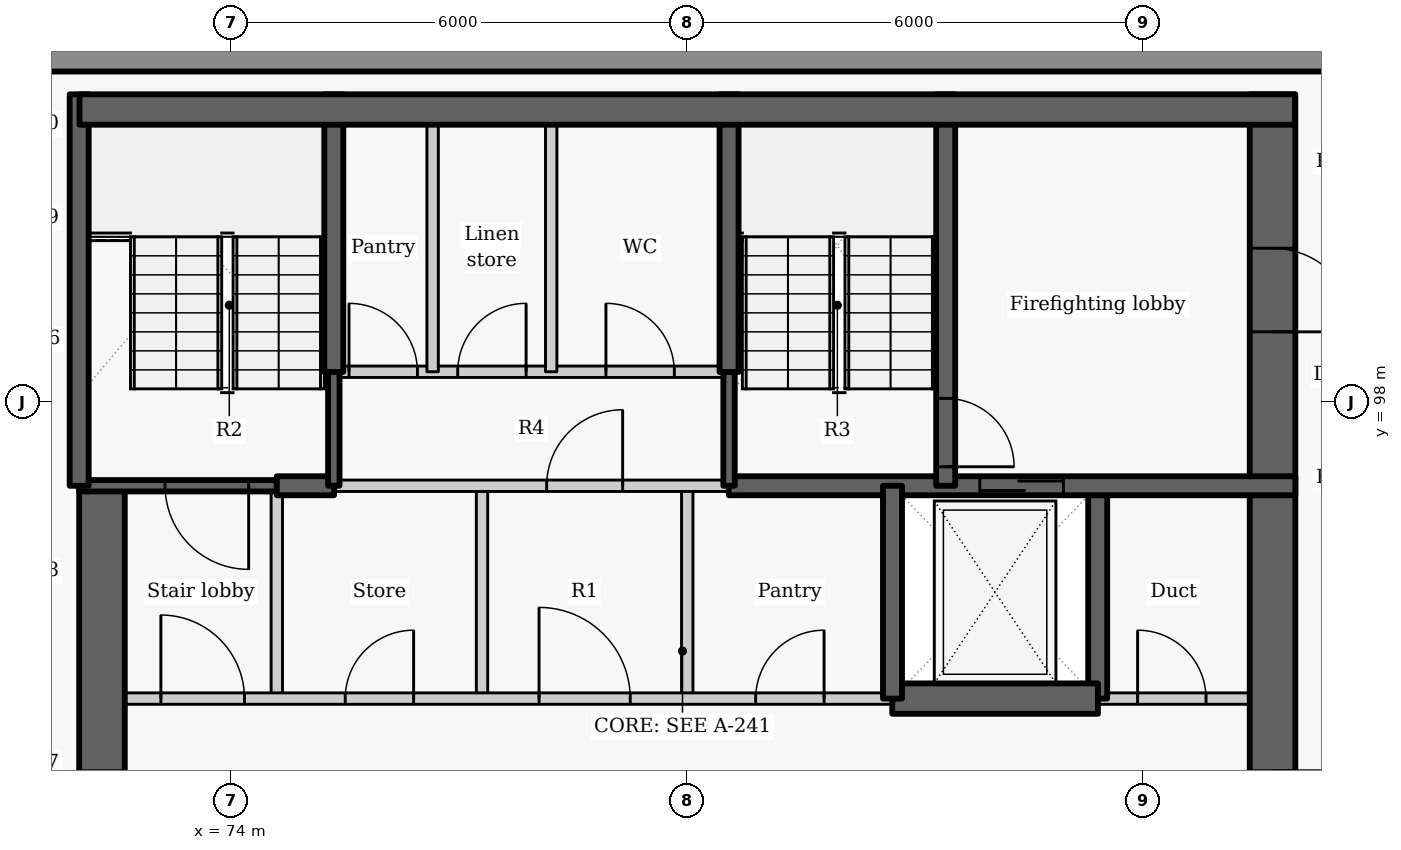
"""IFC4 building model, lengths in metres.
Left out: names, types, materials, properties, quantities, classifications, styles, units other than length and angle.
Written with IfcOpenShell. Run it as: python <this file> out.ifc"""

import sys

from ifc_helpers import new_model, si_unit, direction, frame, frame_2d, origin, place, context, subcontext, project, spatial, rectangle, extrude, element, fill, save


model = new_model("IFC4")
c1 = context("Model", 3, precision=1e-05, world=origin(), true_north=direction((0.0, 1.0)))
c2 = subcontext(c1, "Body", "Model", "MODEL_VIEW")
j1 = project(units=[si_unit("LENGTHUNIT", "METRE"), si_unit("PLANEANGLEUNIT", "RADIAN")], contexts=[c1])
p1 = place(None, origin())
s1 = spatial("IfcSite", under=j1, at=p1, CompositionType="ELEMENT")
p2 = place(p1, origin())
s2 = spatial("IfcBuilding", under=s1, at=p2, CompositionType="ELEMENT")
p3 = place(p2, frame((0.0, 0.0, 239.4)))
s3 = spatial("IfcBuildingStorey", under=s2, at=p3, CompositionType="ELEMENT", Elevation=239.4)
p4 = place(p3, frame((89.499, 102.5, 0.0), z_axis=(0.0, 0.0, 1.0), x_axis=(-1.0, 0.0, 0.0)))
e1 = element("IfcWall", 1, at=p4, inside=s3, PredefinedType="SOLIDWALL", context=c2, shape_type="SweptSolid", body=[
    extrude(rectangle(XDim=19.033, YDim=0.3, at=frame_2d((9.517, 0.0))), origin(), (0.0, 0.0, 1.0), 2.425),
])
p5 = place(p3, frame((74.6, 94.1, 0.0), z_axis=(0.0, 0.0, 1.0), x_axis=(0.0, 1.0, 0.0)))
e2 = element("IfcWall", 2, at=p5, inside=s3, PredefinedType="PARTITIONING", context=c2, shape_type="SweptSolid", body=[
    extrude(rectangle(XDim=2.8, YDim=0.15, at=frame_2d((1.4, 0.0))), origin(), (0.0, 0.0, 1.0), 3.025),
])
p6 = place(p3, frame((72.3, 87.8, -0.275), z_axis=(0.0, 0.0, 1.0), x_axis=(0.0, 1.0, 0.0)))
e3 = element("IfcWall", 3, at=p6, inside=s3, PredefinedType="SHEAR", context=c2, shape_type="SweptSolid", body=[
    extrude(rectangle(XDim=9.1, YDim=0.6, at=frame_2d((4.55, 0.0))), origin(), (0.0, 0.0, 1.0), 3.3),
])
p7 = place(p6, frame((3.85, 0.0, 0.275)))
e4 = element("IfcOpeningElement", 4, at=p7, cuts=e3, PredefinedType="OPENING", context=c2, shape_type="SweptSolid", body=[
    extrude(rectangle(XDim=1.5, YDim=2.1, at=frame_2d((0.75, 1.05))), frame((0.0, 0.31, 0.0), z_axis=(0.0, -1.0, 0.0), x_axis=(1.0, 0.0, 0.0)), (0.0, 0.0, 1.0), 0.62),
])
p8 = place(p3, frame((85.4, 94.1, -0.275), z_axis=(0.0, 0.0, 1.0), x_axis=(0.0, 1.0, 0.0)))
e5 = element("IfcWall", 5, at=p8, inside=s3, PredefinedType="SHEAR", context=c2, shape_type="SweptSolid", body=[
    extrude(rectangle(XDim=2.8, YDim=0.25, at=frame_2d((1.4, 0.0))), origin(), (0.0, 0.0, 1.0), 3.3),
])
p9 = place(p3, frame((87.7, 102.05, -0.275), z_axis=(0.0, 0.0, 1.0), x_axis=(0.0, -1.0, 0.0)))
e6 = element("IfcWall", 6, at=p9, inside=s3, PredefinedType="SHEAR", context=c2, shape_type="SweptSolid", body=[
    extrude(rectangle(XDim=14.25, YDim=0.6, at=frame_2d((7.125, 0.0))), origin(), (0.0, 0.0, 1.0), 3.3),
])
p10 = place(p9, frame((8.9, 0.0, 0.275)))
e7 = element("IfcOpeningElement", 7, at=p10, cuts=e6, PredefinedType="OPENING", context=c2, shape_type="SweptSolid", body=[
    extrude(rectangle(XDim=1.5, YDim=2.1, at=frame_2d((0.75, 1.05))), frame((0.0, 0.31, 0.0), z_axis=(0.0, -1.0, 0.0), x_axis=(1.0, 0.0, 0.0)), (0.0, 0.0, 1.0), 0.62),
])
p11 = place(p9, frame((2.025, 0.0, 0.275)))
e8 = element("IfcOpeningElement", 8, at=p11, cuts=e6, PredefinedType="OPENING", context=c2, shape_type="SweptSolid", body=[
    extrude(rectangle(XDim=1.1, YDim=2.1, at=frame_2d((0.55, 1.05))), frame((0.0, 0.31, 0.0), z_axis=(0.0, -1.0, 0.0), x_axis=(1.0, 0.0, 0.0)), (0.0, 0.0, 1.0), 0.62),
])
for number, where, z_axis, x_axis in (
    (9, (77.3, 94.1, 0.0), (0.0, 0.0, 1.0), (0.0, 1.0, 0.0)),
    (10, (80.0, 94.1, 0.0), (0.0, 0.0, 1.0), (0.0, 1.0, 0.0)),
):
    element("IfcWall", number, at=place(p3, frame(where, z_axis=z_axis, x_axis=x_axis)), inside=s3, PredefinedType="PARTITIONING", context=c2, shape_type="SweptSolid", body=[
        extrude(rectangle(XDim=2.8, YDim=0.15, at=frame_2d((1.4, 0.0))), origin(), (0.0, 0.0, 1.0), 3.025),
    ])
p12 = place(p3, frame((72.0, 94.1, 0.0), z_axis=(0.0, 0.0, 1.0), x_axis=(1.0, 0.0, 0.0)))
e11 = element("IfcWall", 11, at=p12, inside=s3, PredefinedType="PARTITIONING", context=c2, shape_type="SweptSolid", body=[
    extrude(rectangle(XDim=10.703, YDim=0.15, at=frame_2d((5.352, 0.0))), origin(), (0.0, 0.0, 1.0), 3.025),
])
p13 = place(p12, frame((1.075, 0.0, 0.0)))
e12 = element("IfcOpeningElement", 12, at=p13, cuts=e11, PredefinedType="OPENING", context=c2, shape_type="SweptSolid", body=[
    extrude(rectangle(XDim=1.1, YDim=2.1, at=frame_2d((0.55, 1.05))), frame((0.0, 0.085, 0.0), z_axis=(0.0, -1.0, 0.0), x_axis=(1.0, 0.0, 0.0)), (0.0, 0.0, 1.0), 0.17),
])
p14 = place(p12, frame((3.5, 0.0, 0.0)))
e13 = element("IfcOpeningElement", 13, at=p14, cuts=e11, PredefinedType="OPENING", context=c2, shape_type="SweptSolid", body=[
    extrude(rectangle(XDim=0.9, YDim=2.1, at=frame_2d((0.45, 1.05))), frame((0.0, 0.085, 0.0), z_axis=(0.0, -1.0, 0.0), x_axis=(1.0, 0.0, 0.0)), (0.0, 0.0, 1.0), 0.17),
])
p15 = place(p12, frame((6.05, 0.0, 0.0)))
e14 = element("IfcOpeningElement", 14, at=p15, cuts=e11, PredefinedType="OPENING", context=c2, shape_type="SweptSolid", body=[
    extrude(rectangle(XDim=1.2, YDim=2.1, at=frame_2d((0.6, 1.05))), frame((0.0, 0.085, 0.0), z_axis=(0.0, -1.0, 0.0), x_axis=(1.0, 0.0, 0.0)), (0.0, 0.0, 1.0), 0.17),
])
p16 = place(p12, frame((8.9, 0.0, 0.0)))
e15 = element("IfcOpeningElement", 15, at=p16, cuts=e11, PredefinedType="OPENING", context=c2, shape_type="SweptSolid", body=[
    extrude(rectangle(XDim=0.9, YDim=2.1, at=frame_2d((0.45, 1.05))), frame((0.0, 0.085, 0.0), z_axis=(0.0, -1.0, 0.0), x_axis=(1.0, 0.0, 0.0)), (0.0, 0.0, 1.0), 0.17),
])
p17 = place(p3, frame((85.397, 94.1, 0.0), z_axis=(0.0, 0.0, 1.0), x_axis=(1.0, 0.0, 0.0)))
e16 = element("IfcWall", 16, at=p17, inside=s3, PredefinedType="PARTITIONING", context=c2, shape_type="SweptSolid", body=[
    extrude(rectangle(XDim=2.603, YDim=0.15, at=frame_2d((1.302, 0.0))), origin(), (0.0, 0.0, 1.0), 3.025),
])
p18 = place(p17, frame((0.528, 0.0, 0.0)))
e17 = element("IfcOpeningElement", 17, at=p18, cuts=e16, PredefinedType="OPENING", context=c2, shape_type="SweptSolid", body=[
    extrude(rectangle(XDim=0.9, YDim=2.1, at=frame_2d((0.45, 1.05))), frame((0.0, 0.085, 0.0), z_axis=(0.0, -1.0, 0.0), x_axis=(1.0, 0.0, 0.0)), (0.0, 0.0, 1.0), 0.17),
])
p19 = place(p3, frame((82.697, 94.1, -0.275), z_axis=(0.0, 0.0, 1.0), x_axis=(1.0, 0.0, 0.0)))
e18 = element("IfcWall", 18, at=p19, inside=s3, PredefinedType="SHEAR", context=c2, shape_type="SweptSolid", body=[
    extrude(rectangle(XDim=2.706, YDim=0.4, at=frame_2d((1.353, 0.0))), origin(), (0.0, 0.0, 1.0), 3.3),
])
p20 = place(p3, frame((74.6, 96.9, -0.275), z_axis=(0.0, 0.0, 1.0), x_axis=(-1.0, 0.0, 0.0)))
e19 = element("IfcWall", 19, at=p20, inside=s3, PredefinedType="SHEAR", context=c2, shape_type="SweptSolid", body=[
    extrude(rectangle(XDim=2.6, YDim=0.15, at=frame_2d((1.3, 0.0))), origin(), (0.0, 0.0, 1.0), 3.3),
])
p21 = place(p20, frame((0.37, 0.0, 0.275)))
e20 = element("IfcOpeningElement", 20, at=p21, cuts=e19, PredefinedType="OPENING", context=c2, shape_type="SweptSolid", body=[
    extrude(rectangle(XDim=1.1, YDim=2.1, at=frame_2d((0.55, 1.05))), frame((0.0, 0.085, 0.0), z_axis=(0.0, -1.0, 0.0), x_axis=(1.0, 0.0, 0.0)), (0.0, 0.0, 1.0), 0.17),
])
p22 = place(p3, frame((74.6, 96.9, -0.275), z_axis=(0.0, 0.0, 1.0), x_axis=(1.0, 0.0, 0.0)))
e21 = element("IfcWall", 21, at=p22, inside=s3, PredefinedType="SHEAR", context=c2, shape_type="SweptSolid", body=[
    extrude(rectangle(XDim=0.753, YDim=0.25, at=frame_2d((0.376, 0.0))), origin(), (0.0, 0.0, 1.0), 3.3),
])
p23 = place(p3, frame((80.547, 96.9, -0.275), z_axis=(0.0, 0.0, 1.0), x_axis=(1.0, 0.0, 0.0)))
e22 = element("IfcWall", 22, at=p23, inside=s3, PredefinedType="SHEAR", context=c2, shape_type="SweptSolid", body=[
    extrude(rectangle(XDim=7.453, YDim=0.25, at=frame_2d((3.727, 0.0))), origin(), (0.0, 0.0, 1.0), 3.3),
])
p24 = place(p23, frame((3.302, 0.0, 0.275)))
e23 = element("IfcOpeningElement", 23, at=p24, cuts=e22, PredefinedType="OPENING", context=c2, shape_type="SweptSolid", body=[
    extrude(rectangle(XDim=1.1, YDim=2.1, at=frame_2d((0.55, 1.05))), frame((0.0, 0.135, 0.0), z_axis=(0.0, -1.0, 0.0), x_axis=(1.0, 0.0, 0.0)), (0.0, 0.0, 1.0), 0.27),
])
p25 = place(p3, frame((75.347, 96.9, 0.0), z_axis=(0.0, 0.0, 1.0), x_axis=(1.0, 0.0, 0.0)))
e24 = element("IfcWall", 24, at=p25, inside=s3, PredefinedType="PARTITIONING", context=c2, shape_type="SweptSolid", body=[
    extrude(rectangle(XDim=5.206, YDim=0.15, at=frame_2d((2.603, 0.0))), origin(), (0.0, 0.0, 1.0), 3.025),
])
p26 = place(p25, frame((2.803, 0.0, 0.0)))
e25 = element("IfcOpeningElement", 25, at=p26, cuts=e24, PredefinedType="OPENING", context=c2, shape_type="SweptSolid", body=[
    extrude(rectangle(XDim=1.0, YDim=2.1, at=frame_2d((0.5, 1.05))), frame((0.0, 0.085, 0.0), z_axis=(0.0, -1.0, 0.0), x_axis=(1.0, 0.0, 0.0)), (0.0, 0.0, 1.0), 0.17),
])
p27 = place(p3, frame((82.7, 94.1, -0.275), z_axis=(0.0, 0.0, 1.0), x_axis=(0.0, 1.0, 0.0)))
e26 = element("IfcWall", 26, at=p27, inside=s3, PredefinedType="SHEAR", context=c2, shape_type="SweptSolid", body=[
    extrude(rectangle(XDim=2.8, YDim=0.25, at=frame_2d((1.4, 0.0))), origin(), (0.0, 0.0, 1.0), 3.3),
])
p28 = place(p3, frame((75.35, 96.9, -0.275), z_axis=(0.0, 0.0, 1.0), x_axis=(0.0, 1.0, 0.0)))
e27 = element("IfcWall", 27, at=p28, inside=s3, PredefinedType="SHEAR", context=c2, shape_type="SweptSolid", body=[
    extrude(rectangle(XDim=1.503, YDim=0.15, at=frame_2d((0.751, 0.0))), origin(), (0.0, 0.0, 1.0), 3.3),
])
p29 = place(p3, frame((75.35, 98.397, -0.275), z_axis=(0.0, 0.0, 1.0), x_axis=(0.0, 1.0, 0.0)))
e28 = element("IfcWall", 28, at=p29, inside=s3, PredefinedType="SHEAR", context=c2, shape_type="SweptSolid", body=[
    extrude(rectangle(XDim=3.653, YDim=0.25, at=frame_2d((1.827, 0.0))), origin(), (0.0, 0.0, 1.0), 3.3),
])
p30 = place(p3, frame((72.0, 96.9, -0.275), z_axis=(0.0, 0.0, 1.0), x_axis=(0.0, 1.0, 0.0)))
e29 = element("IfcWall", 29, at=p30, inside=s3, PredefinedType="SHEAR", context=c2, shape_type="SweptSolid", body=[
    extrude(rectangle(XDim=5.15, YDim=0.25, at=frame_2d((2.575, 0.0))), origin(), (0.0, 0.0, 1.0), 3.3),
])
p31 = place(p3, frame((83.4, 102.05, -0.275), z_axis=(0.0, 0.0, 1.0), x_axis=(0.0, -1.0, 0.0)))
e30 = element("IfcWall", 30, at=p31, inside=s3, PredefinedType="SHEAR", context=c2, shape_type="SweptSolid", body=[
    extrude(rectangle(XDim=5.15, YDim=0.25, at=frame_2d((2.575, 0.0))), origin(), (0.0, 0.0, 1.0), 3.3),
])
p32 = place(p31, frame((4.0, 0.0, 0.275)))
e31 = element("IfcOpeningElement", 31, at=p32, cuts=e30, PredefinedType="OPENING", context=c2, shape_type="SweptSolid", body=[
    extrude(rectangle(XDim=0.9, YDim=2.1, at=frame_2d((0.45, 1.05))), frame((0.0, 0.135, 0.0), z_axis=(0.0, -1.0, 0.0), x_axis=(1.0, 0.0, 0.0)), (0.0, 0.0, 1.0), 0.27),
])
p33 = place(p3, frame((80.55, 96.9, -0.275), z_axis=(0.0, 0.0, 1.0), x_axis=(0.0, 1.0, 0.0)))
e32 = element("IfcWall", 32, at=p33, inside=s3, PredefinedType="SHEAR", context=c2, shape_type="SweptSolid", body=[
    extrude(rectangle(XDim=1.503, YDim=0.15, at=frame_2d((0.751, 0.0))), origin(), (0.0, 0.0, 1.0), 3.3),
])
p34 = place(p3, frame((80.55, 98.397, -0.275), z_axis=(0.0, 0.0, 1.0), x_axis=(0.0, 1.0, 0.0)))
e33 = element("IfcWall", 33, at=p34, inside=s3, PredefinedType="SHEAR", context=c2, shape_type="SweptSolid", body=[
    extrude(rectangle(XDim=3.653, YDim=0.25, at=frame_2d((1.827, 0.0))), origin(), (0.0, 0.0, 1.0), 3.3),
])
p35 = place(p3, frame((75.35, 98.4, 0.0), z_axis=(0.0, 0.0, 1.0), x_axis=(1.0, 0.0, 0.0)))
e34 = element("IfcWall", 34, at=p35, inside=s3, PredefinedType="PARTITIONING", context=c2, shape_type="SweptSolid", body=[
    extrude(rectangle(XDim=5.2, YDim=0.15, at=frame_2d((2.6, 0.0))), origin(), (0.0, 0.0, 1.0), 3.025),
])
p36 = place(p35, frame((0.2, 0.0, 0.0)))
e35 = element("IfcOpeningElement", 35, at=p36, cuts=e34, PredefinedType="OPENING", context=c2, shape_type="SweptSolid", body=[
    extrude(rectangle(XDim=0.9, YDim=2.1, at=frame_2d((0.45, 1.05))), frame((0.0, 0.085, 0.0), z_axis=(0.0, -1.0, 0.0), x_axis=(1.0, 0.0, 0.0)), (0.0, 0.0, 1.0), 0.17),
])
p37 = place(p35, frame((1.63, 0.0, 0.0)))
e36 = element("IfcOpeningElement", 36, at=p37, cuts=e34, PredefinedType="OPENING", context=c2, shape_type="SweptSolid", body=[
    extrude(rectangle(XDim=0.9, YDim=2.1, at=frame_2d((0.45, 1.05))), frame((0.0, 0.085, 0.0), z_axis=(0.0, -1.0, 0.0), x_axis=(1.0, 0.0, 0.0)), (0.0, 0.0, 1.0), 0.17),
])
p38 = place(p35, frame((3.58, 0.0, 0.0)))
e37 = element("IfcOpeningElement", 37, at=p38, cuts=e34, PredefinedType="OPENING", context=c2, shape_type="SweptSolid", body=[
    extrude(rectangle(XDim=0.9, YDim=2.1, at=frame_2d((0.45, 1.05))), frame((0.0, 0.085, 0.0), z_axis=(0.0, -1.0, 0.0), x_axis=(1.0, 0.0, 0.0)), (0.0, 0.0, 1.0), 0.17),
])
for number, where, z_axis, x_axis in (
    (38, (76.65, 98.4, 0.0), (0.0, 0.0, 1.0), (0.0, 1.0, 0.0)),
    (39, (78.21, 98.4, 0.0), (0.0, 0.0, 1.0), (0.0, 1.0, 0.0)),
):
    element("IfcWall", number, at=place(p3, frame(where, z_axis=z_axis, x_axis=x_axis)), inside=s3, PredefinedType="PARTITIONING", context=c2, shape_type="SweptSolid", body=[
        extrude(rectangle(XDim=3.65, YDim=0.15, at=frame_2d((1.825, 0.0))), origin(), (0.0, 0.0, 1.0), 3.025),
    ])
p39 = place(p3, frame((72.004, 101.85, -0.275), z_axis=(0.0, 0.0, 1.0), x_axis=(1.0, 0.0, 0.0)))
e40 = element("IfcWall", 40, at=p39, inside=s3, PredefinedType="SHEAR", context=c2, shape_type="SweptSolid", body=[
    extrude(rectangle(XDim=15.992, YDim=0.4, at=frame_2d((7.996, 0.0))), origin(), (0.0, 0.0, 1.0), 3.3),
])
p40 = place(p13, origin())
e41 = element("IfcDoor", 41, at=p40, inside=s3, OperationType="SINGLE_SWING_LEFT", PredefinedType="DOOR", context=c2, shape_type="SweptSolid", body=[
    extrude(rectangle(XDim=1.1, YDim=2.1, at=frame_2d((0.55, 1.05))), frame((0.0, 0.025, 0.0), z_axis=(0.0, -1.0, 0.0), x_axis=(1.0, 0.0, 0.0)), (0.0, 0.0, 1.0), 0.05),
])
fill(e12, e41)
p41 = place(p14, origin())
e42 = element("IfcDoor", 42, at=p41, inside=s3, OperationType="SINGLE_SWING_RIGHT", PredefinedType="DOOR", context=c2, shape_type="SweptSolid", body=[
    extrude(rectangle(XDim=0.9, YDim=2.1, at=frame_2d((0.45, 1.05))), frame((0.0, 0.025, 0.0), z_axis=(0.0, -1.0, 0.0), x_axis=(1.0, 0.0, 0.0)), (0.0, 0.0, 1.0), 0.05),
])
fill(e13, e42)
p42 = place(p15, origin())
e43 = element("IfcDoor", 43, at=p42, inside=s3, OperationType="DOUBLE_DOOR_SINGLE_SWING", PredefinedType="DOOR", context=c2, shape_type="SweptSolid", body=[
    extrude(rectangle(XDim=1.2, YDim=2.1, at=frame_2d((0.6, 1.05))), frame((0.0, 0.025, 0.0), z_axis=(0.0, -1.0, 0.0), x_axis=(1.0, 0.0, 0.0)), (0.0, 0.0, 1.0), 0.05),
])
fill(e14, e43)
p43 = place(p16, origin())
e44 = element("IfcDoor", 44, at=p43, inside=s3, OperationType="SINGLE_SWING_RIGHT", PredefinedType="DOOR", context=c2, shape_type="SweptSolid", body=[
    extrude(rectangle(XDim=0.9, YDim=2.1, at=frame_2d((0.45, 1.05))), frame((0.0, 0.025, 0.0), z_axis=(0.0, -1.0, 0.0), x_axis=(1.0, 0.0, 0.0)), (0.0, 0.0, 1.0), 0.05),
])
fill(e15, e44)
p44 = place(p24, origin())
e45 = element("IfcDoor", 45, at=p44, inside=s3, OperationType="SLIDING_TO_LEFT", PredefinedType="DOOR", context=c2, shape_type="SweptSolid", body=[
    extrude(rectangle(XDim=1.1, YDim=2.1, at=frame_2d((0.55, 1.05))), frame((0.0, 0.025, 0.0), z_axis=(0.0, -1.0, 0.0), x_axis=(1.0, 0.0, 0.0)), (0.0, 0.0, 1.0), 0.05),
])
fill(e23, e45)
p45 = place(p18, origin())
e46 = element("IfcDoor", 46, at=p45, inside=s3, OperationType="SINGLE_SWING_LEFT", PredefinedType="DOOR", context=c2, shape_type="SweptSolid", body=[
    extrude(rectangle(XDim=0.9, YDim=2.1, at=frame_2d((0.45, 1.05))), frame((0.0, 0.025, 0.0), z_axis=(0.0, -1.0, 0.0), x_axis=(1.0, 0.0, 0.0)), (0.0, 0.0, 1.0), 0.05),
])
fill(e17, e46)
p46 = place(p26, origin())
e47 = element("IfcDoor", 47, at=p46, inside=s3, OperationType="SINGLE_SWING_RIGHT", PredefinedType="DOOR", context=c2, shape_type="SweptSolid", body=[
    extrude(rectangle(XDim=1.0, YDim=2.1, at=frame_2d((0.5, 1.05))), frame((0.0, 0.025, 0.0), z_axis=(0.0, -1.0, 0.0), x_axis=(1.0, 0.0, 0.0)), (0.0, 0.0, 1.0), 0.05),
])
fill(e25, e47)
p47 = place(p36, origin())
e48 = element("IfcDoor", 48, at=p47, inside=s3, OperationType="SINGLE_SWING_LEFT", PredefinedType="DOOR", context=c2, shape_type="SweptSolid", body=[
    extrude(rectangle(XDim=0.9, YDim=2.1, at=frame_2d((0.45, 1.05))), frame((0.0, 0.025, 0.0), z_axis=(0.0, -1.0, 0.0), x_axis=(1.0, 0.0, 0.0)), (0.0, 0.0, 1.0), 0.05),
])
fill(e35, e48)
p48 = place(p37, origin())
e49 = element("IfcDoor", 49, at=p48, inside=s3, OperationType="SINGLE_SWING_RIGHT", PredefinedType="DOOR", context=c2, shape_type="SweptSolid", body=[
    extrude(rectangle(XDim=0.9, YDim=2.1, at=frame_2d((0.45, 1.05))), frame((0.0, 0.025, 0.0), z_axis=(0.0, -1.0, 0.0), x_axis=(1.0, 0.0, 0.0)), (0.0, 0.0, 1.0), 0.05),
])
fill(e36, e49)
p49 = place(p38, origin())
e50 = element("IfcDoor", 50, at=p49, inside=s3, OperationType="SINGLE_SWING_LEFT", PredefinedType="DOOR", context=c2, shape_type="SweptSolid", body=[
    extrude(rectangle(XDim=0.9, YDim=2.1, at=frame_2d((0.45, 1.05))), frame((0.0, 0.025, 0.0), z_axis=(0.0, -1.0, 0.0), x_axis=(1.0, 0.0, 0.0)), (0.0, 0.0, 1.0), 0.05),
])
fill(e37, e50)
p50 = place(p21, origin())
e51 = element("IfcDoor", 51, at=p50, inside=s3, OperationType="SINGLE_SWING_LEFT", PredefinedType="DOOR", context=c2, shape_type="SweptSolid", body=[
    extrude(rectangle(XDim=1.1, YDim=2.1, at=frame_2d((0.55, 1.05))), frame((0.0, 0.025, 0.0), z_axis=(0.0, -1.0, 0.0), x_axis=(1.0, 0.0, 0.0)), (0.0, 0.0, 1.0), 0.05),
])
fill(e20, e51)
p51 = place(p32, origin())
e52 = element("IfcDoor", 52, at=p51, inside=s3, OperationType="SINGLE_SWING_RIGHT", PredefinedType="DOOR", context=c2, shape_type="SweptSolid", body=[
    extrude(rectangle(XDim=0.9, YDim=2.1, at=frame_2d((0.45, 1.05))), frame((0.0, 0.025, 0.0), z_axis=(0.0, -1.0, 0.0), x_axis=(1.0, 0.0, 0.0)), (0.0, 0.0, 1.0), 0.05),
])
fill(e31, e52)
p52 = place(p10, origin())
e53 = element("IfcDoor", 53, at=p52, inside=s3, OperationType="DOUBLE_DOOR_SINGLE_SWING", PredefinedType="DOOR", context=c2, shape_type="SweptSolid", body=[
    extrude(rectangle(XDim=1.5, YDim=2.1, at=frame_2d((0.75, 1.05))), frame((0.0, 0.025, 0.0), z_axis=(0.0, -1.0, 0.0), x_axis=(1.0, 0.0, 0.0)), (0.0, 0.0, 1.0), 0.05),
])
fill(e7, e53)
p53 = place(p7, origin())
e54 = element("IfcDoor", 54, at=p53, inside=s3, OperationType="DOUBLE_DOOR_SINGLE_SWING", PredefinedType="DOOR", context=c2, shape_type="SweptSolid", body=[
    extrude(rectangle(XDim=1.5, YDim=2.1, at=frame_2d((0.75, 1.05))), frame((0.0, 0.025, 0.0), z_axis=(0.0, -1.0, 0.0), x_axis=(1.0, 0.0, 0.0)), (0.0, 0.0, 1.0), 0.05),
])
fill(e4, e54)
p54 = place(p11, origin())
e55 = element("IfcDoor", 55, at=p54, inside=s3, OperationType="SINGLE_SWING_RIGHT", PredefinedType="DOOR", context=c2, shape_type="SweptSolid", body=[
    extrude(rectangle(XDim=1.1, YDim=2.1, at=frame_2d((0.55, 1.05))), frame((0.0, 0.025, 0.0), z_axis=(0.0, -1.0, 0.0), x_axis=(1.0, 0.0, 0.0)), (0.0, 0.0, 1.0), 0.05),
])
fill(e8, e55)
save(model, sys.argv[1])
